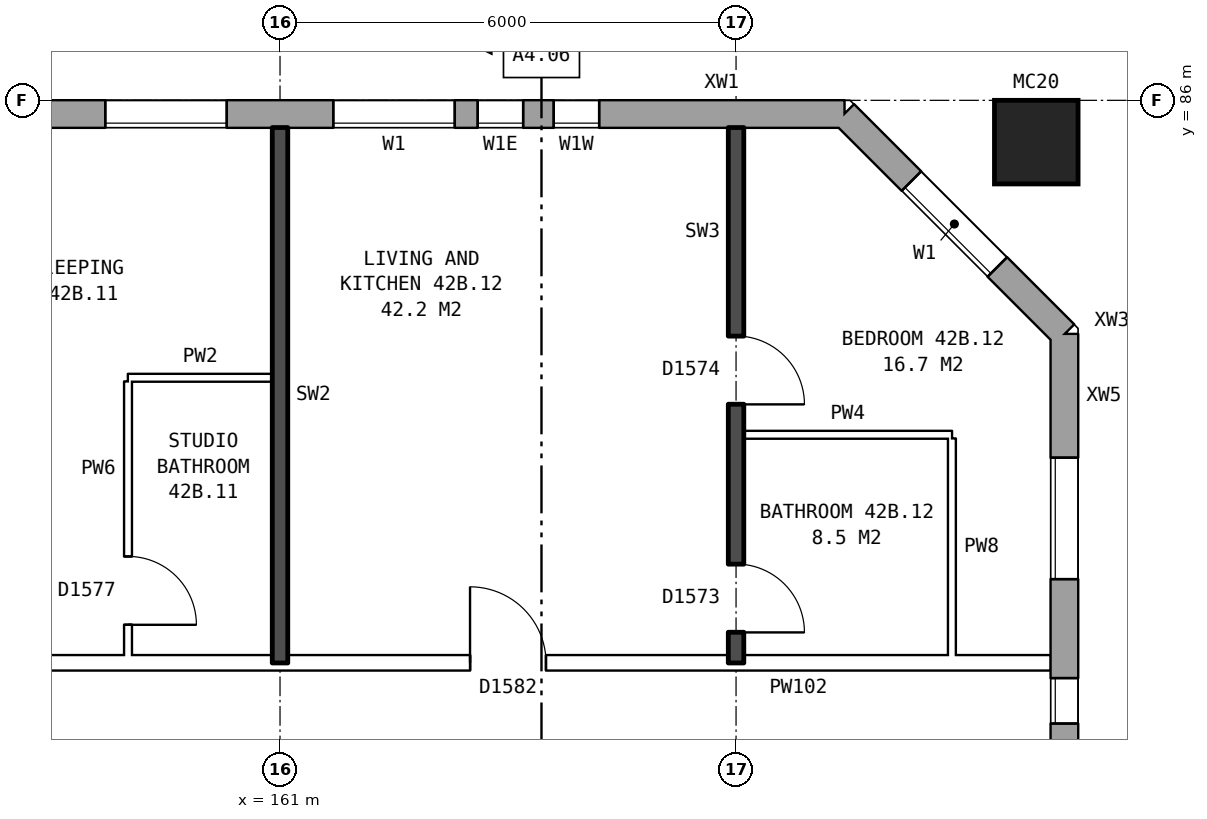
"""IFC4 building model, lengths in metres.
Left out: names, types, materials, properties, quantities, classifications, styles, units other than length and angle.
Written with IfcOpenShell. Run it as: python <this file> out.ifc"""

import sys

from ifc_helpers import new_model, si_unit, direction, frame, frame_2d, origin, origin_2d, place, context, subcontext, project, spatial, rectangle, hollow_rectangle, extrude, element, fill, save


model = new_model("IFC4")
c1 = context("Model", 3, precision=1e-05, world=origin(), true_north=direction((0.0, 1.0)))
c2 = subcontext(c1, "Body", "Model", "MODEL_VIEW")
j1 = project(units=[si_unit("LENGTHUNIT", "METRE"), si_unit("PLANEANGLEUNIT", "RADIAN")], contexts=[c1])
p1 = place(None, origin())
s1 = spatial("IfcSite", under=j1, at=p1, CompositionType="ELEMENT")
p2 = place(p1, origin())
s2 = spatial("IfcBuilding", under=s1, at=p2, CompositionType="ELEMENT")
p3 = place(p2, frame((0.0, 0.0, 151.6)))
s3 = spatial("IfcBuildingStorey", under=s2, at=p3, CompositionType="ELEMENT", Elevation=151.6)
p4 = place(p3, frame((170.95, 85.45, 0.0), z_axis=(0.0, 0.0, 1.0), x_axis=(1.0, 0.0, 0.0)))
e1 = element("IfcColumn", 1, at=p4, inside=s3, PredefinedType="COLUMN", context=c2, shape_type="SweptSolid", body=[
    extrude(hollow_rectangle(XDim=1.1, YDim=1.1, WallThickness=0.06, at=origin_2d()), origin(), (0.0, 0.0, 1.0), 3.1),
])
p5 = place(p3, frame((171.32, 57.075, 0.0), z_axis=(0.0, 0.0, 1.0), x_axis=(0.0, 1.0, 0.0)))
e2 = element("IfcWall", 2, at=p5, inside=s3, PredefinedType="STANDARD", context=c2, shape_type="SweptSolid", body=[
    extrude(rectangle(XDim=25.851, YDim=0.36, at=frame_2d((12.925, 0.0))), origin(), (0.0, 0.0, 1.0), 2.85),
])
p6 = place(p5, frame((1.625, 0.0, 0.8)))
e3 = element("IfcOpeningElement", 3, at=p6, cuts=e2, PredefinedType="OPENING", context=c2, shape_type="SweptSolid", body=[
    extrude(rectangle(XDim=1.6, YDim=1.8, at=frame_2d((0.8, 0.9))), frame((0.0, 0.19, 0.0), z_axis=(0.0, -1.0, 0.0), x_axis=(1.0, 0.0, 0.0)), (0.0, 0.0, 1.0), 0.38),
])
p7 = place(p5, frame((4.525, 0.0, 1.7)))
e4 = element("IfcOpeningElement", 4, at=p7, cuts=e2, PredefinedType="OPENING", context=c2, shape_type="SweptSolid", body=[
    extrude(rectangle(XDim=0.6, YDim=0.9, at=frame_2d((0.3, 0.45))), frame((0.0, 0.19, 0.0), z_axis=(0.0, -1.0, 0.0), x_axis=(1.0, 0.0, 0.0)), (0.0, 0.0, 1.0), 0.38),
])
p8 = place(p5, frame((7.625, 0.0, 0.8)))
e5 = element("IfcOpeningElement", 5, at=p8, cuts=e2, PredefinedType="OPENING", context=c2, shape_type="SweptSolid", body=[
    extrude(rectangle(XDim=1.6, YDim=1.8, at=frame_2d((0.8, 0.9))), frame((0.0, 0.19, 0.0), z_axis=(0.0, -1.0, 0.0), x_axis=(1.0, 0.0, 0.0)), (0.0, 0.0, 1.0), 0.38),
])
p9 = place(p5, frame((10.625, 0.0, 0.8)))
e6 = element("IfcOpeningElement", 6, at=p9, cuts=e2, PredefinedType="OPENING", context=c2, shape_type="SweptSolid", body=[
    extrude(rectangle(XDim=1.6, YDim=1.8, at=frame_2d((0.8, 0.9))), frame((0.0, 0.19, 0.0), z_axis=(0.0, -1.0, 0.0), x_axis=(1.0, 0.0, 0.0)), (0.0, 0.0, 1.0), 0.38),
])
p10 = place(p5, frame((13.625, 0.0, 0.8)))
e7 = element("IfcOpeningElement", 7, at=p10, cuts=e2, PredefinedType="OPENING", context=c2, shape_type="SweptSolid", body=[
    extrude(rectangle(XDim=1.6, YDim=1.8, at=frame_2d((0.8, 0.9))), frame((0.0, 0.19, 0.0), z_axis=(0.0, -1.0, 0.0), x_axis=(1.0, 0.0, 0.0)), (0.0, 0.0, 1.0), 0.38),
])
p11 = place(p5, frame((16.625, 0.0, 0.8)))
e8 = element("IfcOpeningElement", 8, at=p11, cuts=e2, PredefinedType="OPENING", context=c2, shape_type="SweptSolid", body=[
    extrude(rectangle(XDim=1.6, YDim=1.8, at=frame_2d((0.8, 0.9))), frame((0.0, 0.19, 0.0), z_axis=(0.0, -1.0, 0.0), x_axis=(1.0, 0.0, 0.0)), (0.0, 0.0, 1.0), 0.38),
])
p12 = place(p5, frame((6.125, 0.0, 0.8)))
e9 = element("IfcOpeningElement", 9, at=p12, cuts=e2, PredefinedType="OPENING", context=c2, shape_type="SweptSolid", body=[
    extrude(rectangle(XDim=1.2, YDim=0.9, at=frame_2d((0.6, 0.45))), frame((0.0, 0.19, 0.0), z_axis=(0.0, -1.0, 0.0), x_axis=(1.0, 0.0, 0.0)), (0.0, 0.0, 1.0), 0.38),
])
p13 = place(p5, frame((22.625, 0.0, 0.8)))
e10 = element("IfcOpeningElement", 10, at=p13, cuts=e2, PredefinedType="OPENING", context=c2, shape_type="SweptSolid", body=[
    extrude(rectangle(XDim=1.6, YDim=1.8, at=frame_2d((0.8, 0.9))), frame((0.0, 0.19, 0.0), z_axis=(0.0, -1.0, 0.0), x_axis=(1.0, 0.0, 0.0)), (0.0, 0.0, 1.0), 0.38),
])
p14 = place(p5, frame((9.525, 0.0, 0.8)))
e11 = element("IfcOpeningElement", 11, at=p14, cuts=e2, PredefinedType="OPENING", context=c2, shape_type="SweptSolid", body=[
    extrude(rectangle(XDim=0.8, YDim=1.8, at=frame_2d((0.4, 0.9))), frame((0.0, 0.19, 0.0), z_axis=(0.0, -1.0, 0.0), x_axis=(1.0, 0.0, 0.0)), (0.0, 0.0, 1.0), 0.38),
])
p15 = place(p5, frame((12.525, 0.0, 0.8)))
e12 = element("IfcOpeningElement", 12, at=p15, cuts=e2, PredefinedType="OPENING", context=c2, shape_type="SweptSolid", body=[
    extrude(rectangle(XDim=0.8, YDim=1.8, at=frame_2d((0.4, 0.9))), frame((0.0, 0.19, 0.0), z_axis=(0.0, -1.0, 0.0), x_axis=(1.0, 0.0, 0.0)), (0.0, 0.0, 1.0), 0.38),
])
p16 = place(p5, frame((15.525, 0.0, 0.8)))
e13 = element("IfcOpeningElement", 13, at=p16, cuts=e2, PredefinedType="OPENING", context=c2, shape_type="SweptSolid", body=[
    extrude(rectangle(XDim=0.8, YDim=1.8, at=frame_2d((0.4, 0.9))), frame((0.0, 0.19, 0.0), z_axis=(0.0, -1.0, 0.0), x_axis=(1.0, 0.0, 0.0)), (0.0, 0.0, 1.0), 0.38),
])
p17 = place(p5, frame((18.525, 0.0, 0.8)))
e14 = element("IfcOpeningElement", 14, at=p17, cuts=e2, PredefinedType="OPENING", context=c2, shape_type="SweptSolid", body=[
    extrude(rectangle(XDim=1.0, YDim=0.9, at=frame_2d((0.5, 0.45))), frame((0.0, 0.19, 0.0), z_axis=(0.0, -1.0, 0.0), x_axis=(1.0, 0.0, 0.0)), (0.0, 0.0, 1.0), 0.38),
])
p18 = place(p5, frame((20.725, 0.0, 1.7)))
e15 = element("IfcOpeningElement", 15, at=p18, cuts=e2, PredefinedType="OPENING", context=c2, shape_type="SweptSolid", body=[
    extrude(rectangle(XDim=0.6, YDim=0.9, at=frame_2d((0.3, 0.45))), frame((0.0, 0.19, 0.0), z_axis=(0.0, -1.0, 0.0), x_axis=(1.0, 0.0, 0.0)), (0.0, 0.0, 1.0), 0.38),
])
p19 = place(p3, frame((171.32, 82.925, 0.0), z_axis=(0.0, 0.0, 1.0), x_axis=(-0.707106781187, 0.707106781187, 0.0)))
e16 = element("IfcWall", 16, at=p19, inside=s3, PredefinedType="STANDARD", context=c2, shape_type="SweptSolid", body=[
    extrude(rectangle(XDim=4.094, YDim=0.36, at=frame_2d((2.047, 0.0))), origin(), (0.0, 0.0, 1.0), 2.85),
])
p20 = place(p19, frame((1.247, 0.0, 0.8)))
e17 = element("IfcOpeningElement", 17, at=p20, cuts=e16, PredefinedType="OPENING", context=c2, shape_type="SweptSolid", body=[
    extrude(rectangle(XDim=1.6, YDim=1.8, at=frame_2d((0.8, 0.9))), frame((0.0, 0.19, 0.0), z_axis=(0.0, -1.0, 0.0), x_axis=(1.0, 0.0, 0.0)), (0.0, 0.0, 1.0), 0.38),
])
p21 = place(p3, frame((168.425, 85.82, 0.0), z_axis=(0.0, 0.0, 1.0), x_axis=(-1.0, 0.0, 0.0)))
e18 = element("IfcWall", 18, at=p21, inside=s3, PredefinedType="STANDARD", context=c2, shape_type="SweptSolid", body=[
    extrude(rectangle(XDim=34.351, YDim=0.36, at=frame_2d((17.175, 0.0))), origin(), (0.0, 0.0, 1.0), 2.85),
])
p22 = place(p21, frame((3.225, 0.0, 0.8)))
e19 = element("IfcOpeningElement", 19, at=p22, cuts=e18, PredefinedType="OPENING", context=c2, shape_type="SweptSolid", body=[
    extrude(rectangle(XDim=0.6, YDim=0.9, at=frame_2d((0.3, 0.45))), frame((0.0, 0.19, 0.0), z_axis=(0.0, -1.0, 0.0), x_axis=(1.0, 0.0, 0.0)), (0.0, 0.0, 1.0), 0.38),
])
p23 = place(p21, frame((5.125, 0.0, 0.8)))
e20 = element("IfcOpeningElement", 20, at=p23, cuts=e18, PredefinedType="OPENING", context=c2, shape_type="SweptSolid", body=[
    extrude(rectangle(XDim=1.6, YDim=1.8, at=frame_2d((0.8, 0.9))), frame((0.0, 0.19, 0.0), z_axis=(0.0, -1.0, 0.0), x_axis=(1.0, 0.0, 0.0)), (0.0, 0.0, 1.0), 0.38),
])
p24 = place(p21, frame((8.125, 0.0, 0.8)))
e21 = element("IfcOpeningElement", 21, at=p24, cuts=e18, PredefinedType="OPENING", context=c2, shape_type="SweptSolid", body=[
    extrude(rectangle(XDim=1.6, YDim=1.8, at=frame_2d((0.8, 0.9))), frame((0.0, 0.19, 0.0), z_axis=(0.0, -1.0, 0.0), x_axis=(1.0, 0.0, 0.0)), (0.0, 0.0, 1.0), 0.38),
])
p25 = place(p21, frame((11.125, 0.0, 0.8)))
e22 = element("IfcOpeningElement", 22, at=p25, cuts=e18, PredefinedType="OPENING", context=c2, shape_type="SweptSolid", body=[
    extrude(rectangle(XDim=1.6, YDim=1.8, at=frame_2d((0.8, 0.9))), frame((0.0, 0.19, 0.0), z_axis=(0.0, -1.0, 0.0), x_axis=(1.0, 0.0, 0.0)), (0.0, 0.0, 1.0), 0.38),
])
p26 = place(p21, frame((14.125, 0.0, 0.8)))
e23 = element("IfcOpeningElement", 23, at=p26, cuts=e18, PredefinedType="OPENING", context=c2, shape_type="SweptSolid", body=[
    extrude(rectangle(XDim=1.6, YDim=1.8, at=frame_2d((0.8, 0.9))), frame((0.0, 0.19, 0.0), z_axis=(0.0, -1.0, 0.0), x_axis=(1.0, 0.0, 0.0)), (0.0, 0.0, 1.0), 0.38),
])
p27 = place(p21, frame((17.125, 0.0, 0.8)))
e24 = element("IfcOpeningElement", 24, at=p27, cuts=e18, PredefinedType="OPENING", context=c2, shape_type="SweptSolid", body=[
    extrude(rectangle(XDim=1.6, YDim=1.8, at=frame_2d((0.8, 0.9))), frame((0.0, 0.19, 0.0), z_axis=(0.0, -1.0, 0.0), x_axis=(1.0, 0.0, 0.0)), (0.0, 0.0, 1.0), 0.38),
])
p28 = place(p21, frame((20.125, 0.0, 0.8)))
e25 = element("IfcOpeningElement", 25, at=p28, cuts=e18, PredefinedType="OPENING", context=c2, shape_type="SweptSolid", body=[
    extrude(rectangle(XDim=1.6, YDim=1.8, at=frame_2d((0.8, 0.9))), frame((0.0, 0.19, 0.0), z_axis=(0.0, -1.0, 0.0), x_axis=(1.0, 0.0, 0.0)), (0.0, 0.0, 1.0), 0.38),
])
p29 = place(p21, frame((23.125, 0.0, 0.8)))
e26 = element("IfcOpeningElement", 26, at=p29, cuts=e18, PredefinedType="OPENING", context=c2, shape_type="SweptSolid", body=[
    extrude(rectangle(XDim=1.6, YDim=1.8, at=frame_2d((0.8, 0.9))), frame((0.0, 0.19, 0.0), z_axis=(0.0, -1.0, 0.0), x_axis=(1.0, 0.0, 0.0)), (0.0, 0.0, 1.0), 0.38),
])
p30 = place(p21, frame((26.125, 0.0, 0.8)))
e27 = element("IfcOpeningElement", 27, at=p30, cuts=e18, PredefinedType="OPENING", context=c2, shape_type="SweptSolid", body=[
    extrude(rectangle(XDim=1.6, YDim=1.8, at=frame_2d((0.8, 0.9))), frame((0.0, 0.19, 0.0), z_axis=(0.0, -1.0, 0.0), x_axis=(1.0, 0.0, 0.0)), (0.0, 0.0, 1.0), 0.38),
])
p31 = place(p21, frame((28.025, 0.0, 0.8)))
e28 = element("IfcOpeningElement", 28, at=p31, cuts=e18, PredefinedType="OPENING", context=c2, shape_type="SweptSolid", body=[
    extrude(rectangle(XDim=1.4, YDim=1.8, at=frame_2d((0.7, 0.9))), frame((0.0, 0.19, 0.0), z_axis=(0.0, -1.0, 0.0), x_axis=(1.0, 0.0, 0.0)), (0.0, 0.0, 1.0), 0.38),
])
p32 = place(p21, frame((32.275, 0.0, 1.7)))
e29 = element("IfcOpeningElement", 29, at=p32, cuts=e18, PredefinedType="OPENING", context=c2, shape_type="SweptSolid", body=[
    extrude(rectangle(XDim=0.6, YDim=0.9, at=frame_2d((0.3, 0.45))), frame((0.0, 0.19, 0.0), z_axis=(0.0, -1.0, 0.0), x_axis=(1.0, 0.0, 0.0)), (0.0, 0.0, 1.0), 0.38),
])
p33 = place(p21, frame((4.225, 0.0, 0.8)))
e30 = element("IfcOpeningElement", 30, at=p33, cuts=e18, PredefinedType="OPENING", context=c2, shape_type="SweptSolid", body=[
    extrude(rectangle(XDim=0.6, YDim=1.8, at=frame_2d((0.3, 0.9))), frame((0.0, 0.19, 0.0), z_axis=(0.0, -1.0, 0.0), x_axis=(1.0, 0.0, 0.0)), (0.0, 0.0, 1.0), 0.38),
])
p34 = place(p21, frame((29.725, 0.0, 0.8)))
e31 = element("IfcOpeningElement", 31, at=p34, cuts=e18, PredefinedType="OPENING", context=c2, shape_type="SweptSolid", body=[
    extrude(rectangle(XDim=1.0, YDim=1.2, at=frame_2d((0.5, 0.6))), frame((0.0, 0.19, 0.0), z_axis=(0.0, -1.0, 0.0), x_axis=(1.0, 0.0, 0.0)), (0.0, 0.0, 1.0), 0.38),
])
p35 = place(p21, frame((33.225, 0.0, 0.8)))
e32 = element("IfcOpeningElement", 32, at=p35, cuts=e18, PredefinedType="OPENING", context=c2, shape_type="SweptSolid", body=[
    extrude(rectangle(XDim=0.8, YDim=1.8, at=frame_2d((0.4, 0.9))), frame((0.0, 0.19, 0.0), z_axis=(0.0, -1.0, 0.0), x_axis=(1.0, 0.0, 0.0)), (0.0, 0.0, 1.0), 0.38),
])
p36 = place(p3, frame((155.1, 78.6, 0.0), z_axis=(0.0, 0.0, 1.0), x_axis=(1.0, 0.0, 0.0)))
e33 = element("IfcWall", 33, at=p36, inside=s3, PredefinedType="PARTITIONING", context=c2, shape_type="SweptSolid", body=[
    extrude(rectangle(XDim=16.04, YDim=0.2, at=frame_2d((8.02, 0.0))), origin(), (0.0, 0.0, 1.0), 2.85),
])
p37 = place(p36, frame((1.45, 0.0, 0.0)))
e34 = element("IfcOpeningElement", 34, at=p37, cuts=e33, PredefinedType="OPENING", context=c2, shape_type="SweptSolid", body=[
    extrude(rectangle(XDim=1.0, YDim=2.1, at=frame_2d((0.5, 1.05))), frame((0.0, 0.11, 0.0), z_axis=(0.0, -1.0, 0.0), x_axis=(1.0, 0.0, 0.0)), (0.0, 0.0, 1.0), 0.22),
])
p38 = place(p36, frame((8.4, 0.0, 0.0)))
e35 = element("IfcOpeningElement", 35, at=p38, cuts=e33, PredefinedType="OPENING", context=c2, shape_type="SweptSolid", body=[
    extrude(rectangle(XDim=1.0, YDim=2.1, at=frame_2d((0.5, 1.05))), frame((0.0, 0.11, 0.0), z_axis=(0.0, -1.0, 0.0), x_axis=(1.0, 0.0, 0.0)), (0.0, 0.0, 1.0), 0.22),
])
p39 = place(p3, frame((167.1, 81.6, 0.0), z_axis=(0.0, 0.0, 1.0), x_axis=(1.0, 0.0, 0.0)))
e36 = element("IfcWall", 36, at=p39, inside=s3, PredefinedType="PARTITIONING", context=c2, shape_type="SweptSolid", body=[
    extrude(rectangle(XDim=2.74, YDim=0.1, at=frame_2d((1.37, 0.0))), origin(), (0.0, 0.0, 1.0), 2.85),
])
p40 = place(p3, frame((159.0, 82.35, 0.0), z_axis=(0.0, 0.0, 1.0), x_axis=(1.0, 0.0, 0.0)))
e37 = element("IfcWall", 37, at=p40, inside=s3, PredefinedType="PARTITIONING", context=c2, shape_type="SweptSolid", body=[
    extrude(rectangle(XDim=1.9, YDim=0.1, at=frame_2d((0.95, 0.0))), origin(), (0.0, 0.0, 1.0), 2.85),
])
p41 = place(p3, frame((159.0, 78.7, 0.0), z_axis=(0.0, 0.0, 1.0), x_axis=(0.0, 1.0, 0.0)))
e38 = element("IfcWall", 38, at=p41, inside=s3, PredefinedType="PARTITIONING", context=c2, shape_type="SweptSolid", body=[
    extrude(rectangle(XDim=3.6, YDim=0.1, at=frame_2d((1.8, 0.0))), origin(), (0.0, 0.0, 1.0), 2.85),
])
p42 = place(p41, frame((0.4, 0.0, 0.0)))
e39 = element("IfcOpeningElement", 39, at=p42, cuts=e38, PredefinedType="OPENING", context=c2, shape_type="SweptSolid", body=[
    extrude(rectangle(XDim=0.9, YDim=2.1, at=frame_2d((0.45, 1.05))), frame((0.0, 0.06, 0.0), z_axis=(0.0, -1.0, 0.0), x_axis=(1.0, 0.0, 0.0)), (0.0, 0.0, 1.0), 0.12),
])
p43 = place(p3, frame((161.0, 78.6, 0.0), z_axis=(0.0, 0.0, 1.0), x_axis=(0.0, 1.0, 0.0)))
e40 = element("IfcWall", 40, at=p43, inside=s3, PredefinedType="SOLIDWALL", context=c2, shape_type="SweptSolid", body=[
    extrude(rectangle(XDim=7.04, YDim=0.2, at=frame_2d((3.52, 0.0))), origin(), (0.0, 0.0, 1.0), 2.85),
])
p44 = place(p3, frame((167.0, 78.6, 0.0), z_axis=(0.0, 0.0, 1.0), x_axis=(0.0, 1.0, 0.0)))
e41 = element("IfcWall", 41, at=p44, inside=s3, PredefinedType="SOLIDWALL", context=c2, shape_type="SweptSolid", body=[
    extrude(rectangle(XDim=7.04, YDim=0.2, at=frame_2d((3.52, 0.0))), origin(), (0.0, 0.0, 1.0), 2.85),
])
p45 = place(p44, frame((3.4, 0.0, 0.0)))
e42 = element("IfcOpeningElement", 42, at=p45, cuts=e41, PredefinedType="OPENING", context=c2, shape_type="SweptSolid", body=[
    extrude(rectangle(XDim=0.9, YDim=2.1, at=frame_2d((0.45, 1.05))), frame((0.0, 0.11, 0.0), z_axis=(0.0, -1.0, 0.0), x_axis=(1.0, 0.0, 0.0)), (0.0, 0.0, 1.0), 0.22),
])
p46 = place(p44, frame((0.4, 0.0, 0.0)))
e43 = element("IfcOpeningElement", 43, at=p46, cuts=e41, PredefinedType="OPENING", context=c2, shape_type="SweptSolid", body=[
    extrude(rectangle(XDim=0.9, YDim=2.1, at=frame_2d((0.45, 1.05))), frame((0.0, 0.11, 0.0), z_axis=(0.0, -1.0, 0.0), x_axis=(1.0, 0.0, 0.0)), (0.0, 0.0, 1.0), 0.22),
])
p47 = place(p3, frame((169.84, 78.7, 0.0), z_axis=(0.0, 0.0, 1.0), x_axis=(0.0, 1.0, 0.0)))
e44 = element("IfcWall", 44, at=p47, inside=s3, PredefinedType="PARTITIONING", context=c2, shape_type="SweptSolid", body=[
    extrude(rectangle(XDim=2.85, YDim=0.1, at=frame_2d((1.425, 0.0))), origin(), (0.0, 0.0, 1.0), 2.85),
])
p48 = place(p13, origin())
e45 = element("IfcWindow", 45, at=p48, inside=s3, PartitioningType="SINGLE_PANEL", PredefinedType="WINDOW", context=c2, shape_type="SweptSolid", body=[
    extrude(rectangle(XDim=1.6, YDim=1.8, at=frame_2d((0.8, 0.9))), frame((0.0, 0.15, 0.0), z_axis=(0.0, -1.0, 0.0), x_axis=(1.0, 0.0, 0.0)), (0.0, 0.0, 1.0), 0.06),
])
fill(e10, e45)
p49 = place(p20, origin())
e46 = element("IfcWindow", 46, at=p49, inside=s3, PartitioningType="SINGLE_PANEL", PredefinedType="WINDOW", context=c2, shape_type="SweptSolid", body=[
    extrude(rectangle(XDim=1.6, YDim=1.8, at=frame_2d((0.8, 0.9))), frame((0.0, 0.15, 0.0), z_axis=(0.0, -1.0, 0.0), x_axis=(1.0, 0.0, 0.0)), (0.0, 0.0, 1.0), 0.06),
])
fill(e17, e46)
p50 = place(p22, origin())
e47 = element("IfcWindow", 47, at=p50, inside=s3, PartitioningType="SINGLE_PANEL", PredefinedType="WINDOW", context=c2, shape_type="SweptSolid", body=[
    extrude(rectangle(XDim=0.6, YDim=0.9, at=frame_2d((0.3, 0.45))), frame((0.0, 0.15, 0.0), z_axis=(0.0, -1.0, 0.0), x_axis=(1.0, 0.0, 0.0)), (0.0, 0.0, 1.0), 0.06),
])
fill(e19, e47)
p51 = place(p23, origin())
e48 = element("IfcWindow", 48, at=p51, inside=s3, PartitioningType="SINGLE_PANEL", PredefinedType="WINDOW", context=c2, shape_type="SweptSolid", body=[
    extrude(rectangle(XDim=1.6, YDim=1.8, at=frame_2d((0.8, 0.9))), frame((0.0, 0.15, 0.0), z_axis=(0.0, -1.0, 0.0), x_axis=(1.0, 0.0, 0.0)), (0.0, 0.0, 1.0), 0.06),
])
fill(e20, e48)
p52 = place(p24, origin())
e49 = element("IfcWindow", 49, at=p52, inside=s3, PartitioningType="SINGLE_PANEL", PredefinedType="WINDOW", context=c2, shape_type="SweptSolid", body=[
    extrude(rectangle(XDim=1.6, YDim=1.8, at=frame_2d((0.8, 0.9))), frame((0.0, 0.15, 0.0), z_axis=(0.0, -1.0, 0.0), x_axis=(1.0, 0.0, 0.0)), (0.0, 0.0, 1.0), 0.06),
])
fill(e21, e49)
p53 = place(p42, frame((0.9, 0.0, 0.0), z_axis=(0.0, 0.0, 1.0), x_axis=(-1.0, 0.0, 0.0)))
e50 = element("IfcDoor", 50, at=p53, inside=s3, OperationType="SINGLE_SWING_RIGHT", PredefinedType="DOOR", context=c2, shape_type="SweptSolid", body=[
    extrude(rectangle(XDim=0.9, YDim=2.1, at=frame_2d((0.45, 1.05))), frame((0.0, 0.025, 0.0), z_axis=(0.0, -1.0, 0.0), x_axis=(1.0, 0.0, 0.0)), (0.0, 0.0, 1.0), 0.05),
])
fill(e39, e50)
p54 = place(p45, frame((0.9, 0.0, 0.0), z_axis=(0.0, 0.0, 1.0), x_axis=(-1.0, 0.0, 0.0)))
e51 = element("IfcDoor", 51, at=p54, inside=s3, OperationType="SINGLE_SWING_RIGHT", PredefinedType="DOOR", context=c2, shape_type="SweptSolid", body=[
    extrude(rectangle(XDim=0.9, YDim=2.1, at=frame_2d((0.45, 1.05))), frame((0.0, 0.025, 0.0), z_axis=(0.0, -1.0, 0.0), x_axis=(1.0, 0.0, 0.0)), (0.0, 0.0, 1.0), 0.05),
])
fill(e42, e51)
p55 = place(p38, origin())
e52 = element("IfcDoor", 52, at=p55, inside=s3, OperationType="SINGLE_SWING_LEFT", PredefinedType="DOOR", context=c2, shape_type="SweptSolid", body=[
    extrude(rectangle(XDim=1.0, YDim=2.1, at=frame_2d((0.5, 1.05))), frame((0.0, 0.025, 0.0), z_axis=(0.0, -1.0, 0.0), x_axis=(1.0, 0.0, 0.0)), (0.0, 0.0, 1.0), 0.05),
])
fill(e35, e52)
p56 = place(p46, frame((0.9, 0.0, 0.0), z_axis=(0.0, 0.0, 1.0), x_axis=(-1.0, 0.0, 0.0)))
e53 = element("IfcDoor", 53, at=p56, inside=s3, OperationType="SINGLE_SWING_RIGHT", PredefinedType="DOOR", context=c2, shape_type="SweptSolid", body=[
    extrude(rectangle(XDim=0.9, YDim=2.1, at=frame_2d((0.45, 1.05))), frame((0.0, 0.025, 0.0), z_axis=(0.0, -1.0, 0.0), x_axis=(1.0, 0.0, 0.0)), (0.0, 0.0, 1.0), 0.05),
])
fill(e43, e53)
p57 = place(p18, origin())
e54 = element("IfcWindow", 54, at=p57, inside=s3, PartitioningType="SINGLE_PANEL", PredefinedType="WINDOW", context=c2, shape_type="SweptSolid", body=[
    extrude(rectangle(XDim=0.6, YDim=0.9, at=frame_2d((0.3, 0.45))), frame((0.0, 0.15, 0.0), z_axis=(0.0, -1.0, 0.0), x_axis=(1.0, 0.0, 0.0)), (0.0, 0.0, 1.0), 0.06),
])
fill(e15, e54)
p58 = place(p33, origin())
e55 = element("IfcWindow", 55, at=p58, inside=s3, PartitioningType="SINGLE_PANEL", PredefinedType="WINDOW", context=c2, shape_type="SweptSolid", body=[
    extrude(rectangle(XDim=0.6, YDim=1.8, at=frame_2d((0.3, 0.9))), frame((0.0, 0.15, 0.0), z_axis=(0.0, -1.0, 0.0), x_axis=(1.0, 0.0, 0.0)), (0.0, 0.0, 1.0), 0.06),
])
fill(e30, e55)
save(model, sys.argv[1])
